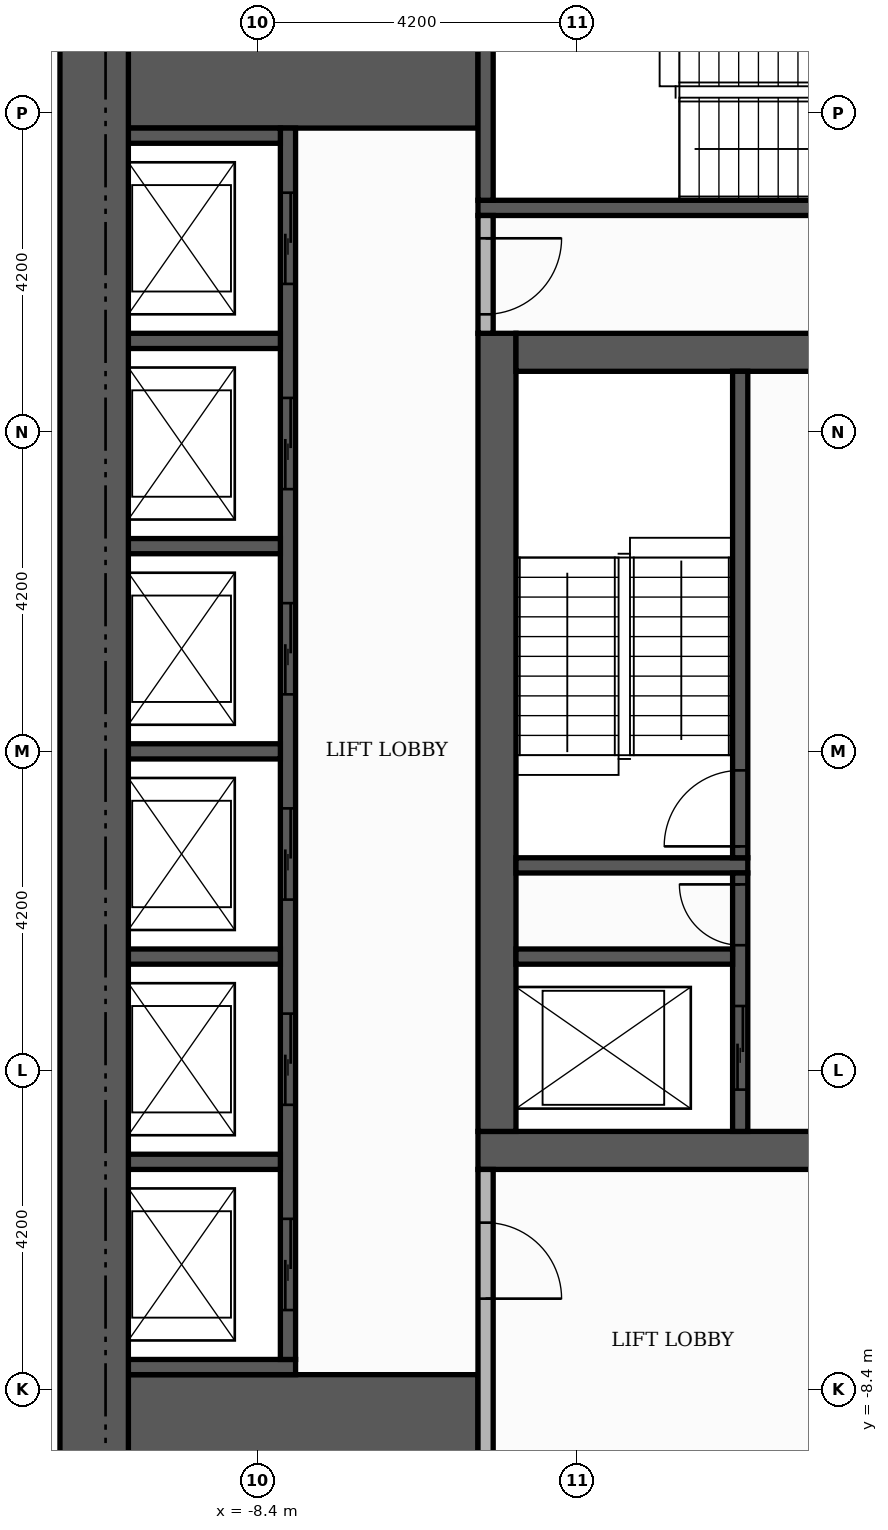
"""IFC4 building model, lengths in metres.
Left out: names, types, materials, properties, quantities, classifications, styles, units other than length and angle.
Written with IfcOpenShell. Run it as: python <this file> out.ifc"""

import sys

from ifc_helpers import new_model, si_unit, direction, frame, frame_2d, origin, place, context, subcontext, project, spatial, rectangle, extrude, element, fill, save


model = new_model("IFC4")
c1 = context("Model", 3, precision=1e-05, world=origin(), true_north=direction((0.0, 1.0)))
c2 = subcontext(c1, "Body", "Model", "MODEL_VIEW")
j1 = project(units=[si_unit("LENGTHUNIT", "METRE"), si_unit("PLANEANGLEUNIT", "RADIAN")], contexts=[c1])
p1 = place(None, origin())
s1 = spatial("IfcSite", under=j1, at=p1, CompositionType="ELEMENT")
p2 = place(p1, origin())
s2 = spatial("IfcBuilding", under=s1, at=p2, CompositionType="ELEMENT")
p3 = place(p2, frame((0.0, 0.0, 87.0)))
s3 = spatial("IfcBuildingStorey", under=s2, at=p3, CompositionType="ELEMENT", Elevation=87.0)
p4 = place(p3, frame((-5.5, -5.25, 0.0), z_axis=(0.0, 0.0, 1.0), x_axis=(1.0, 0.0, 0.0)))
e1 = element("IfcWall", 1, at=p4, inside=s3, PredefinedType="SHEAR", context=c2, shape_type="SweptSolid", body=[
    extrude(rectangle(XDim=11.0, YDim=0.5, at=frame_2d((5.5, 0.0))), origin(), (0.0, 0.0, 1.0), 3.48),
])
p5 = place(p4, frame((4.9, 0.0, 0.0)))
e2 = element("IfcOpeningElement", 2, at=p5, cuts=e1, PredefinedType="OPENING", context=c2, shape_type="SweptSolid", body=[
    extrude(rectangle(XDim=1.2, YDim=2.1, at=frame_2d((0.6, 1.05))), frame((0.0, 0.26, 0.0), z_axis=(0.0, -1.0, 0.0), x_axis=(1.0, 0.0, 0.0)), (0.0, 0.0, 1.0), 0.52),
])
p6 = place(p3, frame((-5.25, -5.0, 0.0), z_axis=(0.0, 0.0, 1.0), x_axis=(0.0, 1.0, 0.0)))
e3 = element("IfcWall", 3, at=p6, inside=s3, PredefinedType="SHEAR", context=c2, shape_type="SweptSolid", body=[
    extrude(rectangle(XDim=10.5, YDim=0.5, at=frame_2d((5.25, 0.0))), origin(), (0.0, 0.0, 1.0), 3.48),
])
p7 = place(p3, frame((-5.0, 5.25, 0.0), z_axis=(0.0, 0.0, 1.0), x_axis=(1.0, 0.0, 0.0)))
e4 = element("IfcWall", 4, at=p7, inside=s3, PredefinedType="SHEAR", context=c2, shape_type="SweptSolid", body=[
    extrude(rectangle(XDim=10.0, YDim=0.5, at=frame_2d((5.0, 0.0))), origin(), (0.0, 0.0, 1.0), 3.48),
])
p8 = place(p7, frame((4.4, 0.0, 0.0)))
e5 = element("IfcOpeningElement", 5, at=p8, cuts=e4, PredefinedType="OPENING", context=c2, shape_type="SweptSolid", body=[
    extrude(rectangle(XDim=1.2, YDim=2.1, at=frame_2d((0.6, 1.05))), frame((0.0, 0.26, 0.0), z_axis=(0.0, -1.0, 0.0), x_axis=(1.0, 0.0, 0.0)), (0.0, 0.0, 1.0), 0.52),
])
for number, where, z_axis, x_axis in (
    (6, (-10.1, -9.15, 0.0), (0.0, 0.0, 1.0), (1.0, 0.0, 0.0)),
    (7, (-10.1, 9.15, 0.0), (0.0, 0.0, 1.0), (1.0, 0.0, 0.0)),
):
    element("IfcWall", number, at=place(p3, frame(where, z_axis=z_axis, x_axis=x_axis)), inside=s3, PredefinedType="SHEAR", context=c2, shape_type="SweptSolid", body=[
        extrude(rectangle(XDim=4.6, YDim=1.9, at=frame_2d((2.3, 0.0))), origin(), (0.0, 0.0, 1.0), 3.48),
    ])
p9 = place(p3, frame((-5.0, -1.5, 0.0), z_axis=(0.0, 0.0, 1.0), x_axis=(1.0, 0.0, 0.0)))
e8 = element("IfcWall", 8, at=p9, inside=s3, PredefinedType="SHEAR", context=c2, shape_type="SweptSolid", body=[
    extrude(rectangle(XDim=3.05, YDim=0.2, at=frame_2d((1.525, 0.0))), origin(), (0.0, 0.0, 1.0), 3.48),
])
p10 = place(p3, frame((-2.05, -1.4, 0.0), z_axis=(0.0, 0.0, 1.0), x_axis=(0.0, 1.0, 0.0)))
e9 = element("IfcWall", 9, at=p10, inside=s3, PredefinedType="SHEAR", context=c2, shape_type="SweptSolid", body=[
    extrude(rectangle(XDim=6.4, YDim=0.2, at=frame_2d((3.2, 0.0))), origin(), (0.0, 0.0, 1.0), 3.48),
])
p11 = place(p10, frame((0.15, 0.0, 0.0)))
e10 = element("IfcOpeningElement", 10, at=p11, cuts=e9, PredefinedType="OPENING", context=c2, shape_type="SweptSolid", body=[
    extrude(rectangle(XDim=1.0, YDim=2.1, at=frame_2d((0.5, 1.05))), frame((0.0, 0.11, 0.0), z_axis=(0.0, -1.0, 0.0), x_axis=(1.0, 0.0, 0.0)), (0.0, 0.0, 1.0), 0.22),
])
p12 = place(p3, frame((-5.5, 7.15, 0.0), z_axis=(0.0, 0.0, 1.0), x_axis=(1.0, 0.0, 0.0)))
e11 = element("IfcWall", 11, at=p12, inside=s3, PredefinedType="SHEAR", context=c2, shape_type="SweptSolid", body=[
    extrude(rectangle(XDim=6.8, YDim=0.2, at=frame_2d((3.4, 0.0))), origin(), (0.0, 0.0, 1.0), 3.48),
])
p13 = place(p3, frame((-5.4, 7.25, 0.0), z_axis=(0.0, 0.0, 1.0), x_axis=(0.0, 1.0, 0.0)))
e12 = element("IfcWall", 12, at=p13, inside=s3, PredefinedType="SHEAR", context=c2, shape_type="SweptSolid", body=[
    extrude(rectangle(XDim=2.85, YDim=0.2, at=frame_2d((1.425, 0.0))), origin(), (0.0, 0.0, 1.0), 3.48),
])
p14 = place(p3, frame((-10.1, -8.1, 0.0), z_axis=(0.0, 0.0, 1.0), x_axis=(1.0, 0.0, 0.0)))
e13 = element("IfcWall", 13, at=p14, inside=s3, PredefinedType="SHEAR", context=c2, shape_type="SweptSolid", body=[
    extrude(rectangle(XDim=2.2, YDim=0.2, at=frame_2d((1.1, 0.0))), origin(), (0.0, 0.0, 1.0), 3.48),
])
p15 = place(p3, frame((-8.0, -8.0, 0.0), z_axis=(0.0, 0.0, 1.0), x_axis=(0.0, 1.0, 0.0)))
e14 = element("IfcWall", 14, at=p15, inside=s3, PredefinedType="SHEAR", context=c2, shape_type="SweptSolid", body=[
    extrude(rectangle(XDim=16.2, YDim=0.2, at=frame_2d((8.1, 0.0))), origin(), (0.0, 0.0, 1.0), 3.48),
])
p16 = place(p15, frame((0.65, 0.0, 0.0)))
e15 = element("IfcOpeningElement", 15, at=p16, cuts=e14, PredefinedType="OPENING", context=c2, shape_type="SweptSolid", body=[
    extrude(rectangle(XDim=1.2, YDim=2.1, at=frame_2d((0.6, 1.05))), frame((0.0, 0.11, 0.0), z_axis=(0.0, -1.0, 0.0), x_axis=(1.0, 0.0, 0.0)), (0.0, 0.0, 1.0), 0.22),
])
p17 = place(p15, frame((3.35, 0.0, 0.0)))
e16 = element("IfcOpeningElement", 16, at=p17, cuts=e14, PredefinedType="OPENING", context=c2, shape_type="SweptSolid", body=[
    extrude(rectangle(XDim=1.2, YDim=2.1, at=frame_2d((0.6, 1.05))), frame((0.0, 0.11, 0.0), z_axis=(0.0, -1.0, 0.0), x_axis=(1.0, 0.0, 0.0)), (0.0, 0.0, 1.0), 0.22),
])
p18 = place(p15, frame((6.05, 0.0, 0.0)))
e17 = element("IfcOpeningElement", 17, at=p18, cuts=e14, PredefinedType="OPENING", context=c2, shape_type="SweptSolid", body=[
    extrude(rectangle(XDim=1.2, YDim=2.1, at=frame_2d((0.6, 1.05))), frame((0.0, 0.11, 0.0), z_axis=(0.0, -1.0, 0.0), x_axis=(1.0, 0.0, 0.0)), (0.0, 0.0, 1.0), 0.22),
])
p19 = place(p15, frame((8.75, 0.0, 0.0)))
e18 = element("IfcOpeningElement", 18, at=p19, cuts=e14, PredefinedType="OPENING", context=c2, shape_type="SweptSolid", body=[
    extrude(rectangle(XDim=1.2, YDim=2.1, at=frame_2d((0.6, 1.05))), frame((0.0, 0.11, 0.0), z_axis=(0.0, -1.0, 0.0), x_axis=(1.0, 0.0, 0.0)), (0.0, 0.0, 1.0), 0.22),
])
p20 = place(p15, frame((11.45, 0.0, 0.0)))
e19 = element("IfcOpeningElement", 19, at=p20, cuts=e14, PredefinedType="OPENING", context=c2, shape_type="SweptSolid", body=[
    extrude(rectangle(XDim=1.2, YDim=2.1, at=frame_2d((0.6, 1.05))), frame((0.0, 0.11, 0.0), z_axis=(0.0, -1.0, 0.0), x_axis=(1.0, 0.0, 0.0)), (0.0, 0.0, 1.0), 0.22),
])
p21 = place(p15, frame((14.15, 0.0, 0.0)))
e20 = element("IfcOpeningElement", 20, at=p21, cuts=e14, PredefinedType="OPENING", context=c2, shape_type="SweptSolid", body=[
    extrude(rectangle(XDim=1.2, YDim=2.1, at=frame_2d((0.6, 1.05))), frame((0.0, 0.11, 0.0), z_axis=(0.0, -1.0, 0.0), x_axis=(1.0, 0.0, 0.0)), (0.0, 0.0, 1.0), 0.22),
])
p22 = place(p3, frame((-10.1, -5.4, 0.0), z_axis=(0.0, 0.0, 1.0), x_axis=(1.0, 0.0, 0.0)))
e21 = element("IfcWall", 21, at=p22, inside=s3, PredefinedType="SHEAR", context=c2, shape_type="SweptSolid", body=[
    extrude(rectangle(XDim=2.0, YDim=0.2, at=frame_2d((1.0, 0.0))), origin(), (0.0, 0.0, 1.0), 3.48),
])
p23 = place(p3, frame((-2.05, -5.0, 0.0), z_axis=(0.0, 0.0, 1.0), x_axis=(0.0, 1.0, 0.0)))
e22 = element("IfcWall", 22, at=p23, inside=s3, PredefinedType="SHEAR", context=c2, shape_type="SweptSolid", body=[
    extrude(rectangle(XDim=3.4, YDim=0.2, at=frame_2d((1.7, 0.0))), origin(), (0.0, 0.0, 1.0), 3.48),
])
p24 = place(p23, frame((0.55, 0.0, 0.0)))
e23 = element("IfcOpeningElement", 23, at=p24, cuts=e22, PredefinedType="OPENING", context=c2, shape_type="SweptSolid", body=[
    extrude(rectangle(XDim=1.1, YDim=2.1, at=frame_2d((0.55, 1.05))), frame((0.0, 0.11, 0.0), z_axis=(0.0, -1.0, 0.0), x_axis=(1.0, 0.0, 0.0)), (0.0, 0.0, 1.0), 0.22),
])
p25 = place(p23, frame((2.45, 0.0, 0.0)))
e24 = element("IfcOpeningElement", 24, at=p25, cuts=e22, PredefinedType="OPENING", context=c2, shape_type="SweptSolid", body=[
    extrude(rectangle(XDim=0.8, YDim=2.1, at=frame_2d((0.4, 1.05))), frame((0.0, 0.11, 0.0), z_axis=(0.0, -1.0, 0.0), x_axis=(1.0, 0.0, 0.0)), (0.0, 0.0, 1.0), 0.22),
])
p26 = place(p3, frame((-10.1, -2.7, 0.0), z_axis=(0.0, 0.0, 1.0), x_axis=(1.0, 0.0, 0.0)))
e25 = element("IfcWall", 25, at=p26, inside=s3, PredefinedType="SHEAR", context=c2, shape_type="SweptSolid", body=[
    extrude(rectangle(XDim=2.0, YDim=0.2, at=frame_2d((1.0, 0.0))), origin(), (0.0, 0.0, 1.0), 3.48),
])
p27 = place(p3, frame((-5.0, -2.7, 0.0), z_axis=(0.0, 0.0, 1.0), x_axis=(1.0, 0.0, 0.0)))
e26 = element("IfcWall", 26, at=p27, inside=s3, PredefinedType="SHEAR", context=c2, shape_type="SweptSolid", body=[
    extrude(rectangle(XDim=2.85, YDim=0.2, at=frame_2d((1.425, 0.0))), origin(), (0.0, 0.0, 1.0), 3.48),
])
for number, where, z_axis, x_axis in (
    (27, (-10.1, 0.0, 0.0), (0.0, 0.0, 1.0), (1.0, 0.0, 0.0)),
    (28, (-10.1, 2.7, 0.0), (0.0, 0.0, 1.0), (1.0, 0.0, 0.0)),
    (29, (-10.1, 5.4, 0.0), (0.0, 0.0, 1.0), (1.0, 0.0, 0.0)),
    (30, (-10.1, 8.1, 0.0), (0.0, 0.0, 1.0), (1.0, 0.0, 0.0)),
):
    element("IfcWall", number, at=place(p3, frame(where, z_axis=z_axis, x_axis=x_axis)), inside=s3, PredefinedType="SHEAR", context=c2, shape_type="SweptSolid", body=[
        extrude(rectangle(XDim=2.0, YDim=0.2, at=frame_2d((1.0, 0.0))), origin(), (0.0, 0.0, 1.0), 3.48),
    ])
p28 = place(p3, frame((-10.55, -10.1, 0.0), z_axis=(0.0, 0.0, 1.0), x_axis=(0.0, 1.0, 0.0)))
e31 = element("IfcWall", 31, at=p28, inside=s3, PredefinedType="SHEAR", context=c2, shape_type="SweptSolid", body=[
    extrude(rectangle(XDim=20.2, YDim=0.9, at=frame_2d((10.1, 0.0))), origin(), (0.0, 0.0, 1.0), 3.48),
])
p29 = place(p3, frame((-5.4, -10.1, 0.0), z_axis=(0.0, 0.0, 1.0), x_axis=(0.0, 1.0, 0.0)))
e32 = element("IfcWall", 32, at=p29, inside=s3, PredefinedType="PARTITIONING", context=c2, shape_type="SweptSolid", body=[
    extrude(rectangle(XDim=4.6, YDim=0.2, at=frame_2d((2.3, 0.0))), origin(), (0.0, 0.0, 1.0), 3.48),
])
p30 = place(p29, frame((2.9, 0.0, 0.0)))
e33 = element("IfcOpeningElement", 33, at=p30, cuts=e32, PredefinedType="OPENING", context=c2, shape_type="SweptSolid", body=[
    extrude(rectangle(XDim=1.0, YDim=2.1, at=frame_2d((0.5, 1.05))), frame((0.0, 0.11, 0.0), z_axis=(0.0, -1.0, 0.0), x_axis=(1.0, 0.0, 0.0)), (0.0, 0.0, 1.0), 0.22),
])
p31 = place(p3, frame((-5.4, 5.5, 0.0), z_axis=(0.0, 0.0, 1.0), x_axis=(0.0, 1.0, 0.0)))
e34 = element("IfcWall", 34, at=p31, inside=s3, PredefinedType="PARTITIONING", context=c2, shape_type="SweptSolid", body=[
    extrude(rectangle(XDim=1.55, YDim=0.2, at=frame_2d((0.775, 0.0))), origin(), (0.0, 0.0, 1.0), 3.48),
])
p32 = place(p31, frame((0.25, 0.0, 0.0)))
e35 = element("IfcOpeningElement", 35, at=p32, cuts=e34, PredefinedType="OPENING", context=c2, shape_type="SweptSolid", body=[
    extrude(rectangle(XDim=1.0, YDim=2.1, at=frame_2d((0.5, 1.05))), frame((0.0, 0.11, 0.0), z_axis=(0.0, -1.0, 0.0), x_axis=(1.0, 0.0, 0.0)), (0.0, 0.0, 1.0), 0.22),
])
p33 = place(p16, origin())
e36 = element("IfcDoor", 36, at=p33, inside=s3, OperationType="SLIDING_TO_LEFT", PredefinedType="DOOR", context=c2, shape_type="SweptSolid", body=[
    extrude(rectangle(XDim=1.2, YDim=2.1, at=frame_2d((0.6, 1.05))), frame((0.0, 0.025, 0.0), z_axis=(0.0, -1.0, 0.0), x_axis=(1.0, 0.0, 0.0)), (0.0, 0.0, 1.0), 0.05),
])
fill(e15, e36)
p34 = place(p17, origin())
e37 = element("IfcDoor", 37, at=p34, inside=s3, OperationType="SLIDING_TO_LEFT", PredefinedType="DOOR", context=c2, shape_type="SweptSolid", body=[
    extrude(rectangle(XDim=1.2, YDim=2.1, at=frame_2d((0.6, 1.05))), frame((0.0, 0.025, 0.0), z_axis=(0.0, -1.0, 0.0), x_axis=(1.0, 0.0, 0.0)), (0.0, 0.0, 1.0), 0.05),
])
fill(e16, e37)
p35 = place(p18, origin())
e38 = element("IfcDoor", 38, at=p35, inside=s3, OperationType="SLIDING_TO_LEFT", PredefinedType="DOOR", context=c2, shape_type="SweptSolid", body=[
    extrude(rectangle(XDim=1.2, YDim=2.1, at=frame_2d((0.6, 1.05))), frame((0.0, 0.025, 0.0), z_axis=(0.0, -1.0, 0.0), x_axis=(1.0, 0.0, 0.0)), (0.0, 0.0, 1.0), 0.05),
])
fill(e17, e38)
p36 = place(p19, origin())
e39 = element("IfcDoor", 39, at=p36, inside=s3, OperationType="SLIDING_TO_LEFT", PredefinedType="DOOR", context=c2, shape_type="SweptSolid", body=[
    extrude(rectangle(XDim=1.2, YDim=2.1, at=frame_2d((0.6, 1.05))), frame((0.0, 0.025, 0.0), z_axis=(0.0, -1.0, 0.0), x_axis=(1.0, 0.0, 0.0)), (0.0, 0.0, 1.0), 0.05),
])
fill(e18, e39)
p37 = place(p20, origin())
e40 = element("IfcDoor", 40, at=p37, inside=s3, OperationType="SLIDING_TO_LEFT", PredefinedType="DOOR", context=c2, shape_type="SweptSolid", body=[
    extrude(rectangle(XDim=1.2, YDim=2.1, at=frame_2d((0.6, 1.05))), frame((0.0, 0.025, 0.0), z_axis=(0.0, -1.0, 0.0), x_axis=(1.0, 0.0, 0.0)), (0.0, 0.0, 1.0), 0.05),
])
fill(e19, e40)
p38 = place(p21, origin())
e41 = element("IfcDoor", 41, at=p38, inside=s3, OperationType="SLIDING_TO_LEFT", PredefinedType="DOOR", context=c2, shape_type="SweptSolid", body=[
    extrude(rectangle(XDim=1.2, YDim=2.1, at=frame_2d((0.6, 1.05))), frame((0.0, 0.025, 0.0), z_axis=(0.0, -1.0, 0.0), x_axis=(1.0, 0.0, 0.0)), (0.0, 0.0, 1.0), 0.05),
])
fill(e20, e41)
p39 = place(p24, origin())
e42 = element("IfcDoor", 42, at=p39, inside=s3, OperationType="SLIDING_TO_LEFT", PredefinedType="DOOR", context=c2, shape_type="SweptSolid", body=[
    extrude(rectangle(XDim=1.1, YDim=2.1, at=frame_2d((0.55, 1.05))), frame((0.0, 0.025, 0.0), z_axis=(0.0, -1.0, 0.0), x_axis=(1.0, 0.0, 0.0)), (0.0, 0.0, 1.0), 0.05),
])
fill(e23, e42)
p40 = place(p11, origin())
e43 = element("IfcDoor", 43, at=p40, inside=s3, OperationType="SINGLE_SWING_LEFT", PredefinedType="DOOR", context=c2, shape_type="SweptSolid", body=[
    extrude(rectangle(XDim=1.0, YDim=2.1, at=frame_2d((0.5, 1.05))), frame((0.0, 0.025, 0.0), z_axis=(0.0, -1.0, 0.0), x_axis=(1.0, 0.0, 0.0)), (0.0, 0.0, 1.0), 0.05),
])
fill(e10, e43)
p41 = place(p25, origin())
e44 = element("IfcDoor", 44, at=p41, inside=s3, OperationType="SINGLE_SWING_RIGHT", PredefinedType="DOOR", context=c2, shape_type="SweptSolid", body=[
    extrude(rectangle(XDim=0.8, YDim=2.1, at=frame_2d((0.4, 1.05))), frame((0.0, 0.025, 0.0), z_axis=(0.0, -1.0, 0.0), x_axis=(1.0, 0.0, 0.0)), (0.0, 0.0, 1.0), 0.05),
])
fill(e24, e44)
p42 = place(p32, frame((1.0, 0.0, 0.0), z_axis=(0.0, 0.0, 1.0), x_axis=(-1.0, 0.0, 0.0)))
e45 = element("IfcDoor", 45, at=p42, inside=s3, OperationType="SINGLE_SWING_RIGHT", PredefinedType="DOOR", context=c2, shape_type="SweptSolid", body=[
    extrude(rectangle(XDim=1.0, YDim=2.1, at=frame_2d((0.5, 1.05))), frame((0.0, 0.025, 0.0), z_axis=(0.0, -1.0, 0.0), x_axis=(1.0, 0.0, 0.0)), (0.0, 0.0, 1.0), 0.05),
])
fill(e35, e45)
p43 = place(p30, frame((1.0, 0.0, 0.0), z_axis=(0.0, 0.0, 1.0), x_axis=(-1.0, 0.0, 0.0)))
e46 = element("IfcDoor", 46, at=p43, inside=s3, OperationType="SINGLE_SWING_LEFT", PredefinedType="DOOR", context=c2, shape_type="SweptSolid", body=[
    extrude(rectangle(XDim=1.0, YDim=2.1, at=frame_2d((0.5, 1.05))), frame((0.0, 0.025, 0.0), z_axis=(0.0, -1.0, 0.0), x_axis=(1.0, 0.0, 0.0)), (0.0, 0.0, 1.0), 0.05),
])
fill(e33, e46)
save(model, sys.argv[1])
